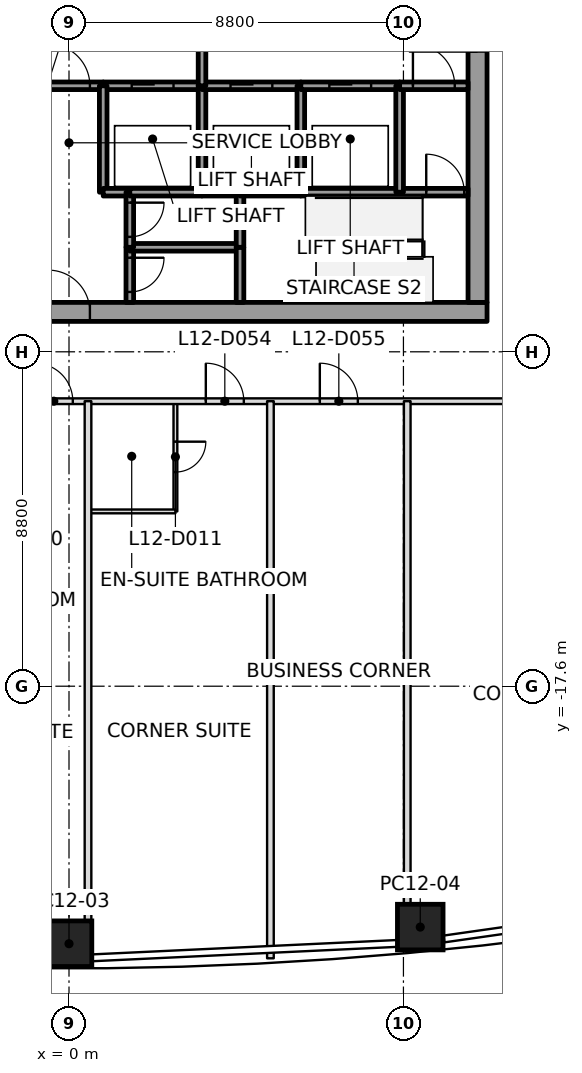
"""IFC4 building model, lengths in metres.
Left out: names, types, materials, properties, quantities, classifications, styles, units other than length and angle.
Written with IfcOpenShell. Run it as: python <this file> out.ifc"""

import sys

from ifc_helpers import new_model, si_unit, direction, frame, frame_2d, origin, origin_2d, place, context, subcontext, project, spatial, rectangle, extrude, clip, halfspace, element, fill, save


model = new_model("IFC4")
c1 = context("Model", 3, precision=1e-05, world=origin(), true_north=direction((0.0, 1.0)))
c2 = subcontext(c1, "Body", "Model", "MODEL_VIEW")
j1 = project(units=[si_unit("LENGTHUNIT", "METRE"), si_unit("PLANEANGLEUNIT", "RADIAN")], contexts=[c1])
p1 = place(None, origin())
s1 = spatial("IfcSite", under=j1, at=p1, CompositionType="ELEMENT")
p2 = place(p1, origin())
s2 = spatial("IfcBuilding", under=s1, at=p2, CompositionType="ELEMENT")
p3 = place(p2, frame((0.0, 0.0, 66.5)))
s3 = spatial("IfcBuildingStorey", under=s2, at=p3, CompositionType="ELEMENT", Elevation=66.5)
p4 = place(p3, frame((0.0, -24.376, 0.0), z_axis=(0.0, 0.219274740936, 0.975663152931), x_axis=(-1.0, 0.0, 0.0)))
e1 = element("IfcColumn", 1, at=p4, inside=s3, PredefinedType="COLUMN", context=c2, shape_type="SweptSolid", body=[
    clip(clip(extrude(rectangle(XDim=1.2, YDim=1.2, at=origin_2d()), origin(), (0.0, 0.0, 1.0), 3.792), halfspace(frame((0.0, 0.0, 0.006)), True)), halfspace(frame((0.0, 0.0, 3.775)), False)),
])
p5 = place(p3, frame((9.242, -23.939, 0.0), z_axis=(-0.00942953432, 0.204607977573, 0.978798579584), x_axis=(-0.990215317111, -0.138199898552, 0.019349775144)))
e2 = element("IfcColumn", 2, at=p5, inside=s3, PredefinedType="COLUMN", context=c2, shape_type="SweptSolid", body=[
    clip(clip(extrude(rectangle(XDim=1.2, YDim=1.2, at=origin_2d()), origin(), (0.0, 0.0, 1.0), 3.78), halfspace(frame((0.0, 0.0, 0.007)), True)), halfspace(frame((0.0, 0.0, 3.762)), False)),
])
p6 = place(p3, frame((-11.0, -7.75, 0.0), z_axis=(0.0, 0.0, 1.0), x_axis=(1.0, 0.0, 0.0)))
e3 = element("IfcWall", 3, at=p6, inside=s3, PredefinedType="SHEAR", context=c2, shape_type="SweptSolid", body=[
    extrude(rectangle(XDim=22.0, YDim=0.5, at=frame_2d((11.0, 0.0))), origin(), (0.0, 0.0, 1.0), 3.7),
])
p7 = place(p6, frame((10.45, 0.0, 0.0)))
e4 = element("IfcOpeningElement", 4, at=p7, cuts=e3, PredefinedType="OPENING", context=c2, shape_type="SweptSolid", body=[
    extrude(rectangle(XDim=1.1, YDim=2.1, at=frame_2d((0.55, 1.05))), frame((0.0, 0.25, 0.0), z_axis=(0.0, -1.0, 0.0), x_axis=(1.0, 0.0, 0.0)), (0.0, 0.0, 1.0), 0.5),
])
p8 = place(p3, frame((10.75, -7.5, 0.0), z_axis=(0.0, 0.0, 1.0), x_axis=(0.0, 1.0, 0.0)))
e5 = element("IfcWall", 5, at=p8, inside=s3, PredefinedType="SHEAR", context=c2, shape_type="SweptSolid", body=[
    extrude(rectangle(XDim=15.0, YDim=0.5, at=frame_2d((7.5, 0.0))), origin(), (0.0, 0.0, 1.0), 3.7),
])
p9 = place(p8, frame((6.6, 0.0, 0.0)))
e6 = element("IfcOpeningElement", 6, at=p9, cuts=e5, PredefinedType="OPENING", context=c2, shape_type="SweptSolid", body=[
    extrude(rectangle(XDim=1.8, YDim=2.1, at=frame_2d((0.9, 1.05))), frame((0.0, 0.25, 0.0), z_axis=(0.0, -1.0, 0.0), x_axis=(1.0, 0.0, 0.0)), (0.0, 0.0, 1.0), 0.5),
])
p10 = place(p3, frame((-0.9, -1.8, 0.0), z_axis=(0.0, 0.0, 1.0), x_axis=(1.0, 0.0, 0.0)))
e7 = element("IfcWall", 7, at=p10, inside=s3, PredefinedType="SOLIDWALL", context=c2, shape_type="SweptSolid", body=[
    extrude(rectangle(XDim=1.8, YDim=0.2, at=frame_2d((0.9, 0.0))), origin(), (0.0, 0.0, 1.0), 3.55),
])
p11 = place(p10, frame((0.35, 0.0, 0.0)))
e8 = element("IfcOpeningElement", 8, at=p11, cuts=e7, PredefinedType="OPENING", context=c2, shape_type="SweptSolid", body=[
    extrude(rectangle(XDim=1.1, YDim=2.1, at=frame_2d((0.55, 1.05))), frame((0.0, 0.1, 0.0), z_axis=(0.0, -1.0, 0.0), x_axis=(1.0, 0.0, 0.0)), (0.0, 0.0, 1.0), 0.2),
])
p12 = place(p3, frame((0.9, -1.8, 0.0), z_axis=(0.0, 0.0, 1.0), x_axis=(1.0, 0.0, 0.0)))
e9 = element("IfcWall", 9, at=p12, inside=s3, PredefinedType="SOLIDWALL", context=c2, shape_type="SweptSolid", body=[
    extrude(rectangle(XDim=2.6, YDim=0.2, at=frame_2d((1.3, 0.0))), origin(), (0.0, 0.0, 1.0), 3.55),
])
p13 = place(p12, frame((0.75, 0.0, 0.0)))
e10 = element("IfcOpeningElement", 10, at=p13, cuts=e9, PredefinedType="OPENING", context=c2, shape_type="SweptSolid", body=[
    extrude(rectangle(XDim=1.1, YDim=2.1, at=frame_2d((0.55, 1.05))), frame((0.0, 0.1, 0.0), z_axis=(0.0, -1.0, 0.0), x_axis=(1.0, 0.0, 0.0)), (0.0, 0.0, 1.0), 0.2),
])
p14 = place(p3, frame((0.9, -1.8, 0.0), z_axis=(0.0, 0.0, 1.0), x_axis=(0.0, -1.0, 0.0)))
e11 = element("IfcWall", 11, at=p14, inside=s3, PredefinedType="SOLIDWALL", context=c2, shape_type="SweptSolid", body=[
    extrude(rectangle(XDim=2.8, YDim=0.2, at=frame_2d((1.4, 0.0))), origin(), (0.0, 0.0, 1.0), 3.55),
])
p15 = place(p3, frame((0.9, -4.6, 0.0), z_axis=(0.0, 0.0, 1.0), x_axis=(1.0, 0.0, 0.0)))
e12 = element("IfcWall", 12, at=p15, inside=s3, PredefinedType="SOLIDWALL", context=c2, shape_type="SweptSolid", body=[
    extrude(rectangle(XDim=0.7, YDim=0.2, at=frame_2d((0.35, 0.0))), origin(), (0.0, 0.0, 1.0), 3.55),
])
p16 = place(p3, frame((1.6, -6.05, 0.0), z_axis=(0.0, 0.0, 1.0), x_axis=(0.0, -1.0, 0.0)))
e13 = element("IfcWall", 13, at=p16, inside=s3, PredefinedType="SOLIDWALL", context=c2, shape_type="SweptSolid", body=[
    extrude(rectangle(XDim=1.45, YDim=0.2, at=frame_2d((0.725, 0.0))), origin(), (0.0, 0.0, 1.0), 3.55),
])
p17 = place(p16, frame((0.275, 0.0, 0.0)))
e14 = element("IfcOpeningElement", 14, at=p17, cuts=e13, PredefinedType="OPENING", context=c2, shape_type="SweptSolid", body=[
    extrude(rectangle(XDim=0.9, YDim=2.1, at=frame_2d((0.45, 1.05))), frame((0.0, 0.1, 0.0), z_axis=(0.0, -1.0, 0.0), x_axis=(1.0, 0.0, 0.0)), (0.0, 0.0, 1.0), 0.2),
])
p18 = place(p3, frame((4.5, -6.05, 0.0), z_axis=(0.0, 0.0, 1.0), x_axis=(-1.0, 0.0, 0.0)))
e15 = element("IfcWall", 15, at=p18, inside=s3, PredefinedType="SOLIDWALL", context=c2, shape_type="SweptSolid", body=[
    extrude(rectangle(XDim=2.9, YDim=0.2, at=frame_2d((1.45, 0.0))), origin(), (0.0, 0.0, 1.0), 3.55),
])
p19 = place(p3, frame((1.6, -4.6, 0.0), z_axis=(0.0, 0.0, 1.0), x_axis=(0.0, -1.0, 0.0)))
e16 = element("IfcWall", 16, at=p19, inside=s3, PredefinedType="SOLIDWALL", context=c2, shape_type="SweptSolid", body=[
    extrude(rectangle(XDim=1.45, YDim=0.2, at=frame_2d((0.725, 0.0))), origin(), (0.0, 0.0, 1.0), 3.55),
])
p20 = place(p19, frame((0.275, 0.0, 0.0)))
e17 = element("IfcOpeningElement", 17, at=p20, cuts=e16, PredefinedType="OPENING", context=c2, shape_type="SweptSolid", body=[
    extrude(rectangle(XDim=0.9, YDim=2.1, at=frame_2d((0.45, 1.05))), frame((0.0, 0.1, 0.0), z_axis=(0.0, -1.0, 0.0), x_axis=(1.0, 0.0, 0.0)), (0.0, 0.0, 1.0), 0.2),
])
p21 = place(p3, frame((3.5, -4.6, 0.0), z_axis=(0.0, 0.0, 1.0), x_axis=(-1.0, 0.0, 0.0)))
e18 = element("IfcWall", 18, at=p21, inside=s3, PredefinedType="SOLIDWALL", context=c2, shape_type="SweptSolid", body=[
    extrude(rectangle(XDim=1.9, YDim=0.2, at=frame_2d((0.95, 0.0))), origin(), (0.0, 0.0, 1.0), 3.55),
])
p22 = place(p3, frame((4.5, -4.6, 0.0), z_axis=(0.0, 0.0, 1.0), x_axis=(-1.0, 0.0, 0.0)))
e19 = element("IfcWall", 19, at=p22, inside=s3, PredefinedType="SOLIDWALL", context=c2, shape_type="SweptSolid", body=[
    extrude(rectangle(XDim=1.0, YDim=0.2, at=frame_2d((0.5, 0.0))), origin(), (0.0, 0.0, 1.0), 3.55),
])
p23 = place(p3, frame((3.5, -4.6, 0.0), z_axis=(0.0, 0.0, 1.0), x_axis=(0.0, 1.0, 0.0)))
e20 = element("IfcWall", 20, at=p23, inside=s3, PredefinedType="SOLIDWALL", context=c2, shape_type="SweptSolid", body=[
    extrude(rectangle(XDim=2.8, YDim=0.2, at=frame_2d((1.4, 0.0))), origin(), (0.0, 0.0, 1.0), 3.55),
])
p24 = place(p3, frame((3.5, -1.8, 0.0), z_axis=(0.0, 0.0, 1.0), x_axis=(1.0, 0.0, 0.0)))
e21 = element("IfcWall", 21, at=p24, inside=s3, PredefinedType="SOLIDWALL", context=c2, shape_type="SweptSolid", body=[
    extrude(rectangle(XDim=2.6, YDim=0.2, at=frame_2d((1.3, 0.0))), origin(), (0.0, 0.0, 1.0), 3.55),
])
p25 = place(p24, frame((0.75, 0.0, 0.0)))
e22 = element("IfcOpeningElement", 22, at=p25, cuts=e21, PredefinedType="OPENING", context=c2, shape_type="SweptSolid", body=[
    extrude(rectangle(XDim=1.1, YDim=2.1, at=frame_2d((0.55, 1.05))), frame((0.0, 0.1, 0.0), z_axis=(0.0, -1.0, 0.0), x_axis=(1.0, 0.0, 0.0)), (0.0, 0.0, 1.0), 0.2),
])
p26 = place(p3, frame((3.5, -1.8, 0.0), z_axis=(0.0, 0.0, 1.0), x_axis=(0.0, 1.0, 0.0)))
e23 = element("IfcWall", 23, at=p26, inside=s3, PredefinedType="SOLIDWALL", context=c2, shape_type="SweptSolid", body=[
    extrude(rectangle(XDim=3.6, YDim=0.2, at=frame_2d((1.8, 0.0))), origin(), (0.0, 0.0, 1.0), 3.55),
])
p27 = place(p26, frame((1.05, 0.0, 0.0)))
e24 = element("IfcOpeningElement", 24, at=p27, cuts=e23, PredefinedType="OPENING", context=c2, shape_type="SweptSolid", body=[
    extrude(rectangle(XDim=1.5, YDim=2.1, at=frame_2d((0.75, 1.05))), frame((0.0, 0.1, 0.0), z_axis=(0.0, -1.0, 0.0), x_axis=(1.0, 0.0, 0.0)), (0.0, 0.0, 1.0), 0.2),
])
for number, where, z_axis, x_axis in (
    (25, (4.5, -7.5, 0.0), (0.0, 0.0, 1.0), (0.0, 1.0, 0.0)),
    (26, (4.5, -6.05, 0.0), (0.0, 0.0, 1.0), (0.0, 1.0, 0.0)),
):
    element("IfcWall", number, at=place(p3, frame(where, z_axis=z_axis, x_axis=x_axis)), inside=s3, PredefinedType="SOLIDWALL", context=c2, shape_type="SweptSolid", body=[
        extrude(rectangle(XDim=1.45, YDim=0.2, at=frame_2d((0.725, 0.0))), origin(), (0.0, 0.0, 1.0), 3.55),
    ])
p28 = place(p3, frame((4.5, -4.6, 0.0), z_axis=(0.0, 0.0, 1.0), x_axis=(1.0, 0.0, 0.0)))
e27 = element("IfcWall", 27, at=p28, inside=s3, PredefinedType="SOLIDWALL", context=c2, shape_type="SweptSolid", body=[
    extrude(rectangle(XDim=1.6, YDim=0.2, at=frame_2d((0.8, 0.0))), origin(), (0.0, 0.0, 1.0), 3.55),
])
p29 = place(p3, frame((6.1, -4.6, 0.0), z_axis=(0.0, 0.0, 1.0), x_axis=(1.0, 0.0, 0.0)))
e28 = element("IfcWall", 28, at=p29, inside=s3, PredefinedType="SOLIDWALL", context=c2, shape_type="SweptSolid", body=[
    extrude(rectangle(XDim=2.6, YDim=0.2, at=frame_2d((1.3, 0.0))), origin(), (0.0, 0.0, 1.0), 3.55),
])
p30 = place(p3, frame((6.1, -4.6, 0.0), z_axis=(0.0, 0.0, 1.0), x_axis=(0.0, 1.0, 0.0)))
e29 = element("IfcWall", 29, at=p30, inside=s3, PredefinedType="SOLIDWALL", context=c2, shape_type="SweptSolid", body=[
    extrude(rectangle(XDim=2.8, YDim=0.2, at=frame_2d((1.4, 0.0))), origin(), (0.0, 0.0, 1.0), 3.55),
])
p31 = place(p3, frame((6.1, -1.8, 0.0), z_axis=(0.0, 0.0, 1.0), x_axis=(1.0, 0.0, 0.0)))
e30 = element("IfcWall", 30, at=p31, inside=s3, PredefinedType="SOLIDWALL", context=c2, shape_type="SweptSolid", body=[
    extrude(rectangle(XDim=2.6, YDim=0.2, at=frame_2d((1.3, 0.0))), origin(), (0.0, 0.0, 1.0), 3.55),
])
p32 = place(p31, frame((0.75, 0.0, 0.0)))
e31 = element("IfcOpeningElement", 31, at=p32, cuts=e30, PredefinedType="OPENING", context=c2, shape_type="SweptSolid", body=[
    extrude(rectangle(XDim=1.1, YDim=2.1, at=frame_2d((0.55, 1.05))), frame((0.0, 0.1, 0.0), z_axis=(0.0, -1.0, 0.0), x_axis=(1.0, 0.0, 0.0)), (0.0, 0.0, 1.0), 0.2),
])
p33 = place(p3, frame((8.7, -4.6, 0.0), z_axis=(0.0, 0.0, 1.0), x_axis=(1.0, 0.0, 0.0)))
e32 = element("IfcWall", 32, at=p33, inside=s3, PredefinedType="SOLIDWALL", context=c2, shape_type="SweptSolid", body=[
    extrude(rectangle(XDim=1.8, YDim=0.2, at=frame_2d((0.9, 0.0))), origin(), (0.0, 0.0, 1.0), 3.55),
])
p34 = place(p33, frame((0.7, 0.0, 0.0)))
e33 = element("IfcOpeningElement", 33, at=p34, cuts=e32, PredefinedType="OPENING", context=c2, shape_type="SweptSolid", body=[
    extrude(rectangle(XDim=1.0, YDim=2.1, at=frame_2d((0.5, 1.05))), frame((0.0, 0.1, 0.0), z_axis=(0.0, -1.0, 0.0), x_axis=(1.0, 0.0, 0.0)), (0.0, 0.0, 1.0), 0.2),
])
p35 = place(p3, frame((8.7, -1.8, 0.0), z_axis=(0.0, 0.0, 1.0), x_axis=(0.0, -1.0, 0.0)))
e34 = element("IfcWall", 34, at=p35, inside=s3, PredefinedType="SOLIDWALL", context=c2, shape_type="SweptSolid", body=[
    extrude(rectangle(XDim=2.8, YDim=0.2, at=frame_2d((1.4, 0.0))), origin(), (0.0, 0.0, 1.0), 3.55),
])
p36 = place(p3, frame((8.7, -1.8, 0.0), z_axis=(0.0, 0.0, 1.0), x_axis=(1.0, 0.0, 0.0)))
e35 = element("IfcWall", 35, at=p36, inside=s3, PredefinedType="SOLIDWALL", context=c2, shape_type="SweptSolid", body=[
    extrude(rectangle(XDim=1.8, YDim=0.2, at=frame_2d((0.9, 0.0))), origin(), (0.0, 0.0, 1.0), 3.55),
])
p37 = place(p36, frame((0.35, 0.0, 0.0)))
e36 = element("IfcOpeningElement", 36, at=p37, cuts=e35, PredefinedType="OPENING", context=c2, shape_type="SweptSolid", body=[
    extrude(rectangle(XDim=1.1, YDim=2.1, at=frame_2d((0.55, 1.05))), frame((0.0, 0.1, 0.0), z_axis=(0.0, -1.0, 0.0), x_axis=(1.0, 0.0, 0.0)), (0.0, 0.0, 1.0), 0.2),
])
p38 = place(p3, frame((0.5, -10.1, 0.0), z_axis=(0.0, 0.0, 1.0), x_axis=(0.0, -1.0, 0.0)))
e37 = element("IfcWall", 37, at=p38, inside=s3, PredefinedType="PARTITIONING", context=c2, shape_type="SweptSolid", body=[
    extrude(rectangle(XDim=14.801, YDim=0.175, at=frame_2d((7.4, 0.0))), origin(), (0.0, 0.0, 1.0), 2.934),
])
p39 = place(p3, frame((5.3, -10.1, 0.0), z_axis=(0.0, 0.0, 1.0), x_axis=(0.0, -1.0, 0.0)))
e38 = element("IfcWall", 38, at=p39, inside=s3, PredefinedType="PARTITIONING", context=c2, shape_type="SweptSolid", body=[
    extrude(rectangle(XDim=14.66, YDim=0.175, at=frame_2d((7.33, 0.0))), origin(), (0.0, 0.0, 1.0), 2.934),
])
p40 = place(p3, frame((8.9, -24.503, 0.0), z_axis=(0.0, 0.0, 1.0), x_axis=(0.0, 1.0, 0.0)))
e39 = element("IfcWall", 39, at=p40, inside=s3, PredefinedType="PARTITIONING", context=c2, shape_type="SweptSolid", body=[
    extrude(rectangle(XDim=14.403, YDim=0.175, at=frame_2d((7.201, 0.0))), origin(), (0.0, 0.0, 1.0), 3.15),
])
p41 = place(p3, frame((-13.02, -10.1, 0.0), z_axis=(0.0, 0.0, 1.0), x_axis=(1.0, 0.0, 0.0)))
e40 = element("IfcWall", 40, at=p41, inside=s3, PredefinedType="PARTITIONING", context=c2, shape_type="SweptSolid", body=[
    extrude(rectangle(XDim=26.04, YDim=0.15, at=frame_2d((13.02, 0.0))), origin(), (0.0, 0.0, 1.0), 2.947),
])
p42 = place(p41, frame((4.02, 0.0, 0.0)))
e41 = element("IfcOpeningElement", 41, at=p42, cuts=e40, PredefinedType="OPENING", context=c2, shape_type="SweptSolid", body=[
    extrude(rectangle(XDim=1.0, YDim=2.1, at=frame_2d((0.5, 1.05))), frame((0.0, 0.075, 0.0), z_axis=(0.0, -1.0, 0.0), x_axis=(1.0, 0.0, 0.0)), (0.0, 0.0, 1.0), 0.15),
])
p43 = place(p41, frame((7.02, 0.0, 0.0)))
e42 = element("IfcOpeningElement", 42, at=p43, cuts=e40, PredefinedType="OPENING", context=c2, shape_type="SweptSolid", body=[
    extrude(rectangle(XDim=1.0, YDim=2.1, at=frame_2d((0.5, 1.05))), frame((0.0, 0.075, 0.0), z_axis=(0.0, -1.0, 0.0), x_axis=(1.0, 0.0, 0.0)), (0.0, 0.0, 1.0), 0.15),
])
p44 = place(p41, frame((12.12, 0.0, 0.0)))
e43 = element("IfcOpeningElement", 43, at=p44, cuts=e40, PredefinedType="OPENING", context=c2, shape_type="SweptSolid", body=[
    extrude(rectangle(XDim=1.0, YDim=2.1, at=frame_2d((0.5, 1.05))), frame((0.0, 0.075, 0.0), z_axis=(0.0, -1.0, 0.0), x_axis=(1.0, 0.0, 0.0)), (0.0, 0.0, 1.0), 0.15),
])
p45 = place(p41, frame((16.62, 0.0, 0.0)))
e44 = element("IfcOpeningElement", 44, at=p45, cuts=e40, PredefinedType="OPENING", context=c2, shape_type="SweptSolid", body=[
    extrude(rectangle(XDim=1.0, YDim=2.1, at=frame_2d((0.5, 1.05))), frame((0.0, 0.075, 0.0), z_axis=(0.0, -1.0, 0.0), x_axis=(1.0, 0.0, 0.0)), (0.0, 0.0, 1.0), 0.15),
])
p46 = place(p41, frame((19.62, 0.0, 0.0)))
e45 = element("IfcOpeningElement", 45, at=p46, cuts=e40, PredefinedType="OPENING", context=c2, shape_type="SweptSolid", body=[
    extrude(rectangle(XDim=1.0, YDim=2.1, at=frame_2d((0.5, 1.05))), frame((0.0, 0.075, 0.0), z_axis=(0.0, -1.0, 0.0), x_axis=(1.0, 0.0, 0.0)), (0.0, 0.0, 1.0), 0.15),
])
p47 = place(p3, frame((2.8, -10.13, 0.0), z_axis=(0.0, 0.0, 1.0), x_axis=(0.0, -1.0, 0.0)))
e46 = element("IfcWall", 46, at=p47, inside=s3, PredefinedType="PARTITIONING", context=c2, shape_type="SweptSolid", body=[
    extrude(rectangle(XDim=2.87, YDim=0.1, at=frame_2d((1.435, 0.0))), origin(), (0.0, 0.0, 1.0), 3.15),
])
p48 = place(p47, frame((1.035, 0.0, 0.0)))
e47 = element("IfcOpeningElement", 47, at=p48, cuts=e46, PredefinedType="OPENING", context=c2, shape_type="SweptSolid", body=[
    extrude(rectangle(XDim=0.8, YDim=2.1, at=frame_2d((0.4, 1.05))), frame((0.0, 0.05, 0.0), z_axis=(0.0, -1.0, 0.0), x_axis=(1.0, 0.0, 0.0)), (0.0, 0.0, 1.0), 0.1),
])
p49 = place(p3, frame((2.8, -13.0, 0.0), z_axis=(0.0, 0.0, 1.0), x_axis=(-1.0, 0.0, 0.0)))
e48 = element("IfcWall", 48, at=p49, inside=s3, PredefinedType="PARTITIONING", context=c2, shape_type="SweptSolid", body=[
    extrude(rectangle(XDim=2.27, YDim=0.1, at=frame_2d((1.135, 0.0))), origin(), (0.0, 0.0, 1.0), 3.15),
])
p50 = place(p44, origin())
e49 = element("IfcDoor", 49, at=p50, inside=s3, OperationType="SINGLE_SWING_LEFT", PredefinedType="DOOR", context=c2, shape_type="SweptSolid", body=[
    extrude(rectangle(XDim=1.0, YDim=2.1, at=frame_2d((0.5, 1.05))), frame((0.0, 0.025, 0.0), z_axis=(0.0, -1.0, 0.0), x_axis=(1.0, 0.0, 0.0)), (0.0, 0.0, 1.0), 0.05),
])
fill(e43, e49)
p51 = place(p45, origin())
e50 = element("IfcDoor", 50, at=p51, inside=s3, OperationType="SINGLE_SWING_LEFT", PredefinedType="DOOR", context=c2, shape_type="SweptSolid", body=[
    extrude(rectangle(XDim=1.0, YDim=2.1, at=frame_2d((0.5, 1.05))), frame((0.0, 0.025, 0.0), z_axis=(0.0, -1.0, 0.0), x_axis=(1.0, 0.0, 0.0)), (0.0, 0.0, 1.0), 0.05),
])
fill(e44, e50)
p52 = place(p48, origin())
e51 = element("IfcDoor", 51, at=p52, inside=s3, OperationType="SINGLE_SWING_LEFT", PredefinedType="DOOR", context=c2, shape_type="SweptSolid", body=[
    extrude(rectangle(XDim=0.8, YDim=2.1, at=frame_2d((0.4, 1.05))), frame((0.0, 0.025, 0.0), z_axis=(0.0, -1.0, 0.0), x_axis=(1.0, 0.0, 0.0)), (0.0, 0.0, 1.0), 0.05),
])
fill(e47, e51)
p53 = place(p46, origin())
e52 = element("IfcDoor", 52, at=p53, inside=s3, OperationType="SINGLE_SWING_LEFT", PredefinedType="DOOR", context=c2, shape_type="SweptSolid", body=[
    extrude(rectangle(XDim=1.0, YDim=2.1, at=frame_2d((0.5, 1.05))), frame((0.0, 0.025, 0.0), z_axis=(0.0, -1.0, 0.0), x_axis=(1.0, 0.0, 0.0)), (0.0, 0.0, 1.0), 0.05),
])
fill(e45, e52)
p54 = place(p13, origin())
e53 = element("IfcDoor", 53, at=p54, inside=s3, OperationType="SLIDING_TO_RIGHT", PredefinedType="DOOR", context=c2, shape_type="SweptSolid", body=[
    extrude(rectangle(XDim=1.1, YDim=2.1, at=frame_2d((0.55, 1.05))), frame((0.0, 0.025, 0.0), z_axis=(0.0, -1.0, 0.0), x_axis=(1.0, 0.0, 0.0)), (0.0, 0.0, 1.0), 0.05),
])
fill(e10, e53)
p55 = place(p25, origin())
e54 = element("IfcDoor", 54, at=p55, inside=s3, OperationType="SLIDING_TO_LEFT", PredefinedType="DOOR", context=c2, shape_type="SweptSolid", body=[
    extrude(rectangle(XDim=1.1, YDim=2.1, at=frame_2d((0.55, 1.05))), frame((0.0, 0.025, 0.0), z_axis=(0.0, -1.0, 0.0), x_axis=(1.0, 0.0, 0.0)), (0.0, 0.0, 1.0), 0.05),
])
fill(e22, e54)
p56 = place(p32, origin())
e55 = element("IfcDoor", 55, at=p56, inside=s3, OperationType="SLIDING_TO_LEFT", PredefinedType="DOOR", context=c2, shape_type="SweptSolid", body=[
    extrude(rectangle(XDim=1.1, YDim=2.1, at=frame_2d((0.55, 1.05))), frame((0.0, 0.025, 0.0), z_axis=(0.0, -1.0, 0.0), x_axis=(1.0, 0.0, 0.0)), (0.0, 0.0, 1.0), 0.05),
])
fill(e31, e55)
p57 = place(p37, origin())
e56 = element("IfcDoor", 56, at=p57, inside=s3, OperationType="SINGLE_SWING_LEFT", PredefinedType="DOOR", context=c2, shape_type="SweptSolid", body=[
    extrude(rectangle(XDim=1.1, YDim=2.1, at=frame_2d((0.55, 1.05))), frame((0.0, 0.025, 0.0), z_axis=(0.0, -1.0, 0.0), x_axis=(1.0, 0.0, 0.0)), (0.0, 0.0, 1.0), 0.05),
])
fill(e36, e56)
p58 = place(p11, origin())
e57 = element("IfcDoor", 57, at=p58, inside=s3, OperationType="SINGLE_SWING_RIGHT", PredefinedType="DOOR", context=c2, shape_type="SweptSolid", body=[
    extrude(rectangle(XDim=1.1, YDim=2.1, at=frame_2d((0.55, 1.05))), frame((0.0, 0.025, 0.0), z_axis=(0.0, -1.0, 0.0), x_axis=(1.0, 0.0, 0.0)), (0.0, 0.0, 1.0), 0.05),
])
fill(e8, e57)
p59 = place(p34, origin())
e58 = element("IfcDoor", 58, at=p59, inside=s3, OperationType="SINGLE_SWING_RIGHT", PredefinedType="DOOR", context=c2, shape_type="SweptSolid", body=[
    extrude(rectangle(XDim=1.0, YDim=2.1, at=frame_2d((0.5, 1.05))), frame((0.0, 0.025, 0.0), z_axis=(0.0, -1.0, 0.0), x_axis=(1.0, 0.0, 0.0)), (0.0, 0.0, 1.0), 0.05),
])
fill(e33, e58)
p60 = place(p17, origin())
e59 = element("IfcDoor", 59, at=p60, inside=s3, OperationType="SINGLE_SWING_RIGHT", PredefinedType="DOOR", context=c2, shape_type="SweptSolid", body=[
    extrude(rectangle(XDim=0.9, YDim=2.1, at=frame_2d((0.45, 1.05))), frame((0.0, 0.025, 0.0), z_axis=(0.0, -1.0, 0.0), x_axis=(1.0, 0.0, 0.0)), (0.0, 0.0, 1.0), 0.05),
])
fill(e14, e59)
p61 = place(p20, origin())
e60 = element("IfcDoor", 60, at=p61, inside=s3, OperationType="SINGLE_SWING_RIGHT", PredefinedType="DOOR", context=c2, shape_type="SweptSolid", body=[
    extrude(rectangle(XDim=0.9, YDim=2.1, at=frame_2d((0.45, 1.05))), frame((0.0, 0.025, 0.0), z_axis=(0.0, -1.0, 0.0), x_axis=(1.0, 0.0, 0.0)), (0.0, 0.0, 1.0), 0.05),
])
fill(e17, e60)
p62 = place(p9, origin())
e61 = element("IfcDoor", 61, at=p62, inside=s3, OperationType="DOUBLE_DOOR_SINGLE_SWING", PredefinedType="DOOR", context=c2, shape_type="SweptSolid", body=[
    extrude(rectangle(XDim=1.8, YDim=2.1, at=frame_2d((0.9, 1.05))), frame((0.0, 0.025, 0.0), z_axis=(0.0, -1.0, 0.0), x_axis=(1.0, 0.0, 0.0)), (0.0, 0.0, 1.0), 0.05),
])
fill(e6, e61)
p63 = place(p7, origin())
e62 = element("IfcDoor", 62, at=p63, inside=s3, OperationType="SINGLE_SWING_LEFT", PredefinedType="DOOR", context=c2, shape_type="SweptSolid", body=[
    extrude(rectangle(XDim=1.1, YDim=2.1, at=frame_2d((0.55, 1.05))), frame((0.0, 0.025, 0.0), z_axis=(0.0, -1.0, 0.0), x_axis=(1.0, 0.0, 0.0)), (0.0, 0.0, 1.0), 0.05),
])
fill(e4, e62)
save(model, sys.argv[1])
